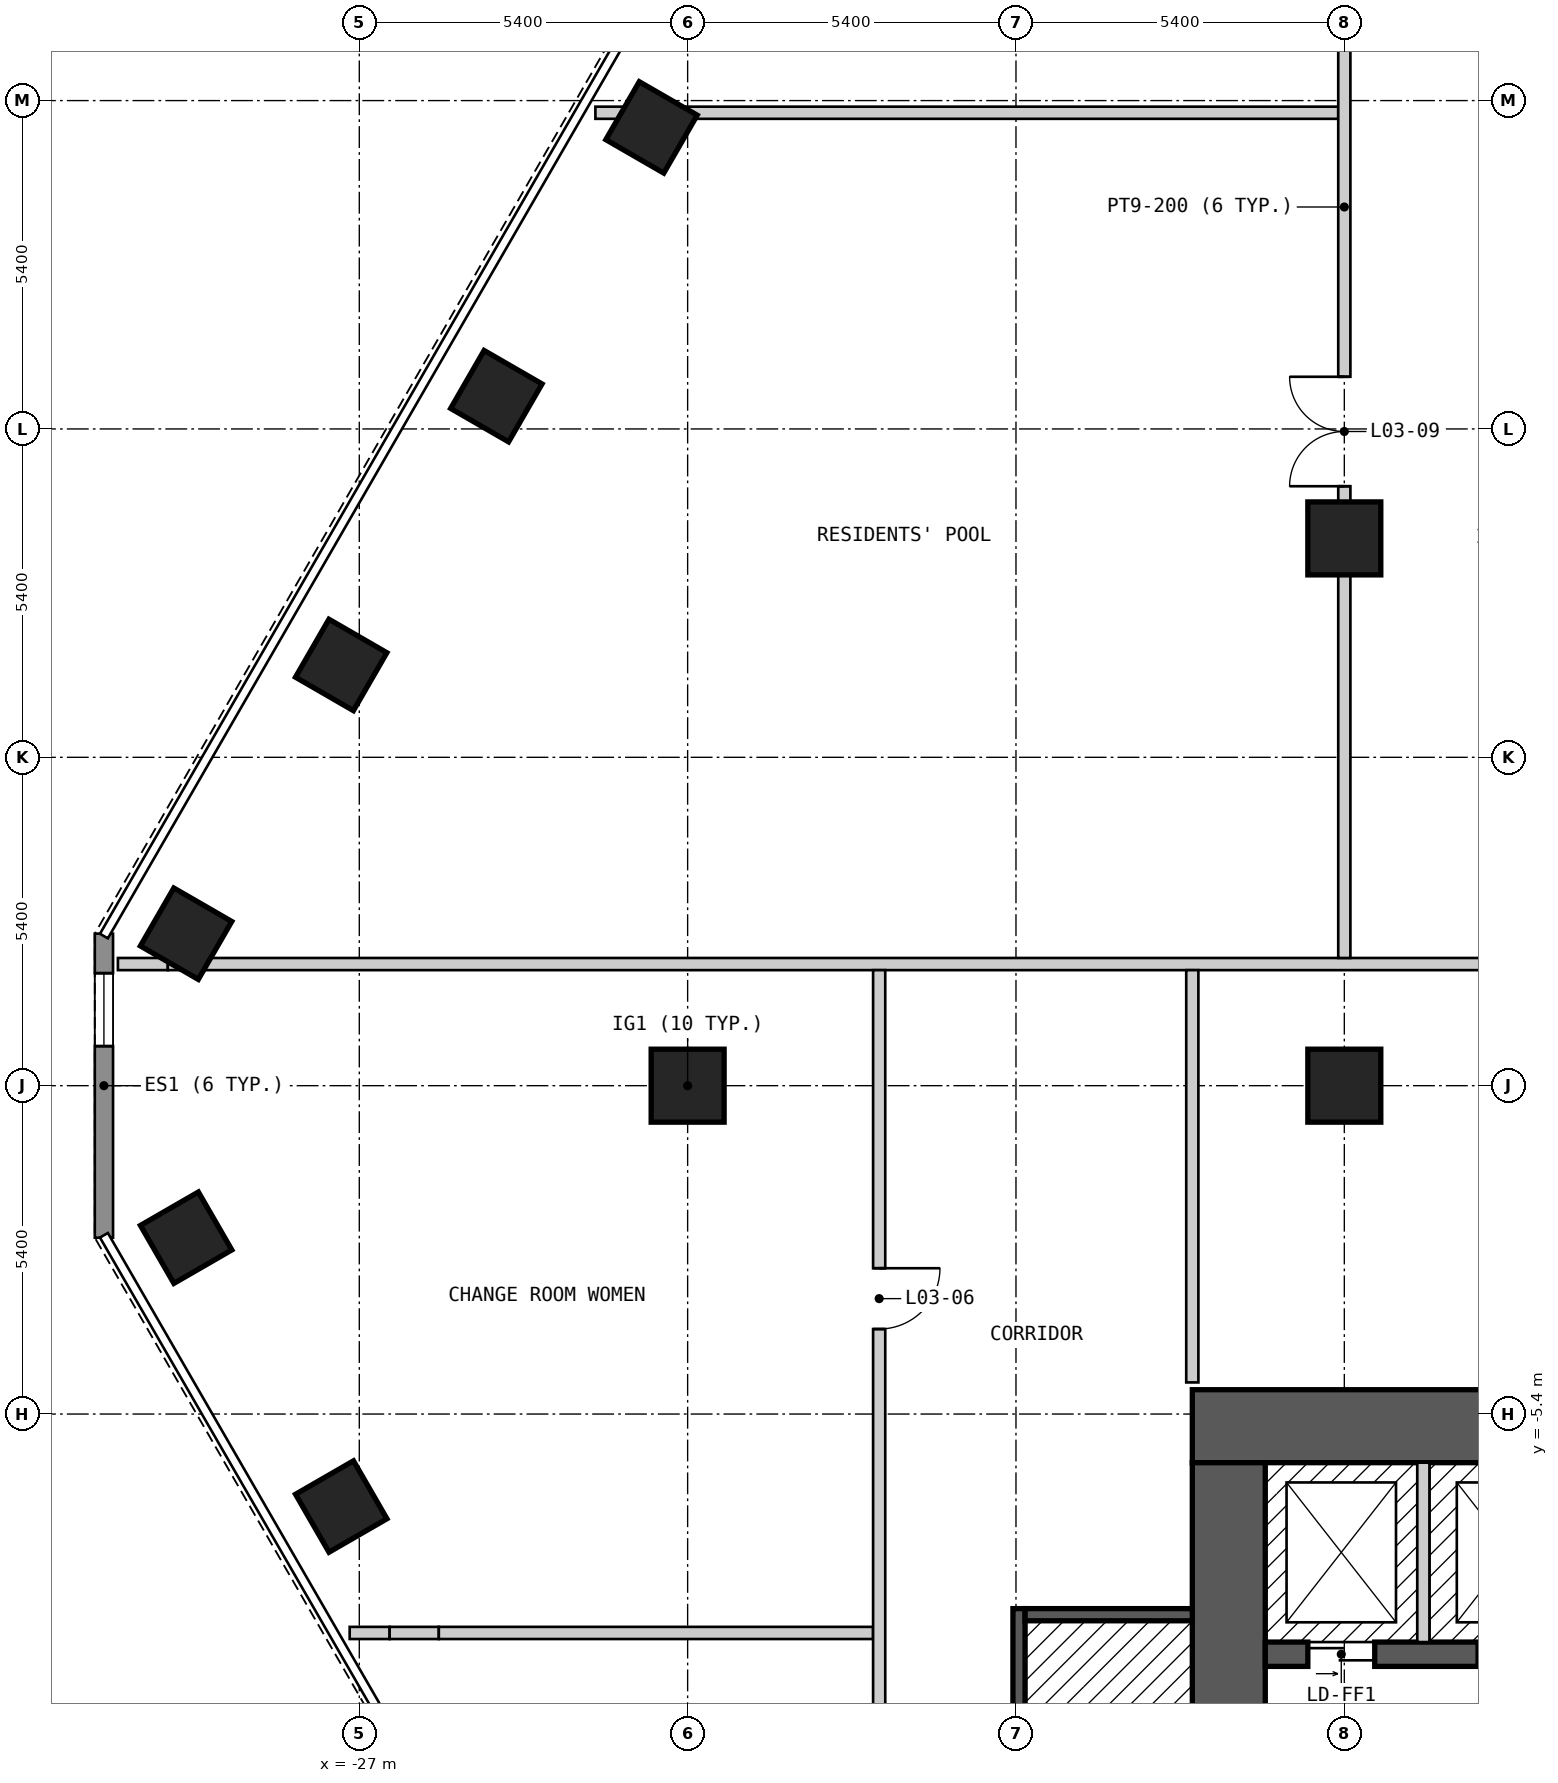
"""IFC4 building model, lengths in metres.
Left out: names, types, materials, properties, quantities, classifications, styles, units other than length and angle.
Written with IfcOpenShell. Run it as: python <this file> out.ifc"""

import sys

from ifc_helpers import new_model, si_unit, direction, frame, frame_2d, origin, origin_2d, place, context, subcontext, project, spatial, polyline, rectangle, outline, extrude, element, fill, save


model = new_model("IFC4")
c1 = context("Model", 3, precision=1e-05, world=origin(), true_north=direction((0.0, 1.0)))
c2 = subcontext(c1, "Body", "Model", "MODEL_VIEW")
j1 = project(units=[si_unit("LENGTHUNIT", "METRE"), si_unit("PLANEANGLEUNIT", "RADIAN")], contexts=[c1])
p1 = place(None, origin())
s1 = spatial("IfcSite", under=j1, at=p1, CompositionType="ELEMENT")
p2 = place(p1, origin())
s2 = spatial("IfcBuilding", under=s1, at=p2, CompositionType="ELEMENT")
p3 = place(p2, frame((0.0, 0.0, 12.6)))
s3 = spatial("IfcBuildingStorey", under=s2, at=p3, CompositionType="ELEMENT", Elevation=12.6)
for number, where, z_axis, x_axis in (
    (1, (-22.194, 15.759, 0.0), (0.0, 0.0, 1.0), (-0.5, -0.866, 0.0)),
    (2, (-24.746, 11.339, 0.0), (0.0, 0.0, 1.0), (-0.5, -0.866, 0.0)),
    (3, (-27.298, 6.919, 0.0), (0.0, 0.0, 1.0), (-0.5, -0.866, 0.0)),
    (4, (-29.849, 2.499, 0.0), (0.0, 0.0, 1.0), (-0.5, -0.866, 0.0)),
    (5, (-29.848, -2.5, 0.0), (0.0, 0.0, 1.0), (0.5, -0.866, 0.0)),
    (6, (-27.297, -6.921, 0.0), (0.0, 0.0, 1.0), (0.5, -0.866, 0.0)),
):
    element("IfcColumn", number, at=place(p3, frame(where, z_axis=z_axis, x_axis=x_axis)), inside=s3, PredefinedType="COLUMN", context=c2, shape_type="SweptSolid", body=[
        extrude(rectangle(XDim=1.1, YDim=1.1, at=origin_2d()), origin(), (0.0, 0.0, 1.0), 3.6),
    ])
for number, where, z_axis, x_axis in (
    (7, (-21.6, 0.0, 0.0), (0.0, 0.0, 1.0), (1.0, 0.0, 0.0)),
    (8, (-10.8, 0.0, 0.0), (0.0, 0.0, 1.0), (1.0, 0.0, 0.0)),
    (9, (-10.8, 9.0, 0.0), (0.0, 0.0, 1.0), (1.0, 0.0, 0.0)),
):
    element("IfcColumn", number, at=place(p3, frame(where, z_axis=z_axis, x_axis=x_axis)), inside=s3, PredefinedType="COLUMN", context=c2, shape_type="SweptSolid", body=[
        extrude(rectangle(XDim=1.2, YDim=1.2, at=origin_2d()), origin(), (0.0, 0.0, 1.0), 3.6),
    ])
p4 = place(p3, frame((-13.3, -5.6, 0.0), z_axis=(0.0, 0.0, 1.0), x_axis=(1.0, 0.0, 0.0)))
e10 = element("IfcWall", 10, at=p4, inside=s3, PredefinedType="SHEAR", context=c2, shape_type="SweptSolid", body=[
    extrude(rectangle(XDim=26.6, YDim=1.2, at=frame_2d((13.3, 0.0))), origin(), (0.0, 0.0, 1.0), 3.25),
])
p5 = place(p4, frame((23.65, 0.0, 0.0)))
e11 = element("IfcOpeningElement", 11, at=p5, cuts=e10, PredefinedType="OPENING", context=c2, shape_type="SweptSolid", body=[
    extrude(rectangle(XDim=1.2, YDim=2.1, at=frame_2d((0.6, 1.05))), frame((0.0, 0.61, 0.0), z_axis=(0.0, -1.0, 0.0), x_axis=(1.0, 0.0, 0.0)), (0.0, 0.0, 1.0), 1.22),
])
p6 = place(p3, frame((-12.7, -17.8, 0.0), z_axis=(0.0, 0.0, 1.0), x_axis=(0.0, 1.0, 0.0)))
e12 = element("IfcWall", 12, at=p6, inside=s3, PredefinedType="SHEAR", context=c2, shape_type="SweptSolid", body=[
    extrude(rectangle(XDim=11.6, YDim=1.2, at=frame_2d((5.8, 0.0))), origin(), (0.0, 0.0, 1.0), 3.25),
])
p7 = place(p6, frame((3.6, 0.0, 0.0)))
e13 = element("IfcOpeningElement", 13, at=p7, cuts=e12, PredefinedType="OPENING", context=c2, shape_type="SweptSolid", body=[
    extrude(rectangle(XDim=1.2, YDim=2.1, at=frame_2d((0.6, 1.05))), frame((0.0, 0.61, 0.0), z_axis=(0.0, -1.0, 0.0), x_axis=(1.0, 0.0, 0.0)), (0.0, 0.0, 1.0), 1.22),
])
p8 = place(p3, frame((-12.1, -9.35, 0.0), z_axis=(0.0, 0.0, 1.0), x_axis=(1.0, 0.0, 0.0)))
e14 = element("IfcWall", 14, at=p8, inside=s3, PredefinedType="SHEAR", context=c2, shape_type="SweptSolid", body=[
    extrude(rectangle(XDim=22.3, YDim=0.4, at=frame_2d((11.15, 0.0))), origin(), (0.0, 0.0, 1.0), 3.25),
])
p9 = place(p8, frame((0.7, 0.0, 0.0)))
e15 = element("IfcOpeningElement", 15, at=p9, cuts=e14, PredefinedType="OPENING", context=c2, shape_type="SweptSolid", body=[
    extrude(rectangle(XDim=1.1, YDim=2.1, at=frame_2d((0.55, 1.05))), frame((0.0, 0.21, 0.0), z_axis=(0.0, -1.0, 0.0), x_axis=(1.0, 0.0, 0.0)), (0.0, 0.0, 1.0), 0.42),
])
p10 = place(p8, frame((3.5, 0.0, 0.0)))
e16 = element("IfcOpeningElement", 16, at=p10, cuts=e14, PredefinedType="OPENING", context=c2, shape_type="SweptSolid", body=[
    extrude(rectangle(XDim=1.1, YDim=2.1, at=frame_2d((0.55, 1.05))), frame((0.0, 0.21, 0.0), z_axis=(0.0, -1.0, 0.0), x_axis=(1.0, 0.0, 0.0)), (0.0, 0.0, 1.0), 0.42),
])
p11 = place(p8, frame((6.3, 0.0, 0.0)))
e17 = element("IfcOpeningElement", 17, at=p11, cuts=e14, PredefinedType="OPENING", context=c2, shape_type="SweptSolid", body=[
    extrude(rectangle(XDim=1.1, YDim=2.1, at=frame_2d((0.55, 1.05))), frame((0.0, 0.21, 0.0), z_axis=(0.0, -1.0, 0.0), x_axis=(1.0, 0.0, 0.0)), (0.0, 0.0, 1.0), 0.42),
])
p12 = place(p8, frame((8.6, 0.0, 0.0)))
e18 = element("IfcOpeningElement", 18, at=p12, cuts=e14, PredefinedType="OPENING", context=c2, shape_type="SweptSolid", body=[
    extrude(rectangle(XDim=1.1, YDim=2.1, at=frame_2d((0.55, 1.05))), frame((0.0, 0.21, 0.0), z_axis=(0.0, -1.0, 0.0), x_axis=(1.0, 0.0, 0.0)), (0.0, 0.0, 1.0), 0.42),
])
p13 = place(p8, frame((10.9, 0.0, 0.0)))
e19 = element("IfcOpeningElement", 19, at=p13, cuts=e14, PredefinedType="OPENING", context=c2, shape_type="SweptSolid", body=[
    extrude(rectangle(XDim=1.1, YDim=2.1, at=frame_2d((0.55, 1.05))), frame((0.0, 0.21, 0.0), z_axis=(0.0, -1.0, 0.0), x_axis=(1.0, 0.0, 0.0)), (0.0, 0.0, 1.0), 0.42),
])
p14 = place(p8, frame((13.2, 0.0, 0.0)))
e20 = element("IfcOpeningElement", 20, at=p14, cuts=e14, PredefinedType="OPENING", context=c2, shape_type="SweptSolid", body=[
    extrude(rectangle(XDim=1.1, YDim=2.1, at=frame_2d((0.55, 1.05))), frame((0.0, 0.21, 0.0), z_axis=(0.0, -1.0, 0.0), x_axis=(1.0, 0.0, 0.0)), (0.0, 0.0, 1.0), 0.42),
])
p15 = place(p8, frame((15.5, 0.0, 0.0)))
e21 = element("IfcOpeningElement", 21, at=p15, cuts=e14, PredefinedType="OPENING", context=c2, shape_type="SweptSolid", body=[
    extrude(rectangle(XDim=1.1, YDim=2.1, at=frame_2d((0.55, 1.05))), frame((0.0, 0.21, 0.0), z_axis=(0.0, -1.0, 0.0), x_axis=(1.0, 0.0, 0.0)), (0.0, 0.0, 1.0), 0.42),
])
p16 = place(p8, frame((17.8, 0.0, 0.0)))
e22 = element("IfcOpeningElement", 22, at=p16, cuts=e14, PredefinedType="OPENING", context=c2, shape_type="SweptSolid", body=[
    extrude(rectangle(XDim=1.1, YDim=2.1, at=frame_2d((0.55, 1.05))), frame((0.0, 0.21, 0.0), z_axis=(0.0, -1.0, 0.0), x_axis=(1.0, 0.0, 0.0)), (0.0, 0.0, 1.0), 0.42),
])
p17 = place(p8, frame((20.2, 0.0, 0.0)))
e23 = element("IfcOpeningElement", 23, at=p17, cuts=e14, PredefinedType="OPENING", context=c2, shape_type="SweptSolid", body=[
    extrude(rectangle(XDim=1.1, YDim=2.1, at=frame_2d((0.55, 1.05))), frame((0.0, 0.21, 0.0), z_axis=(0.0, -1.0, 0.0), x_axis=(1.0, 0.0, 0.0)), (0.0, 0.0, 1.0), 0.42),
])
p18 = place(p3, frame((-31.2, 2.5, 0.0), z_axis=(0.0, 0.0, 1.0), x_axis=(0.0, -1.0, 0.0)))
e24 = element("IfcWall", 24, at=p18, inside=s3, PredefinedType="SOLIDWALL", context=c2, shape_type="SweptSolid", body=[
    extrude(outline(polyline([(0.0, -0.15), (5.0, -0.15), (4.92, 0.15), (0.08, 0.15), (0.0, -0.15)])), origin(), (0.0, 0.0, 1.0), 3.25),
])
p19 = place(p18, frame((0.65, 0.0, 0.15)))
e25 = element("IfcOpeningElement", 25, at=p19, cuts=e24, PredefinedType="OPENING", context=c2, shape_type="SweptSolid", body=[
    extrude(rectangle(XDim=1.2, YDim=2.1, at=frame_2d((0.6, 1.05))), frame((0.0, 0.16, 0.0), z_axis=(0.0, -1.0, 0.0), x_axis=(1.0, 0.0, 0.0)), (0.0, 0.0, 1.0), 0.32),
])
p20 = place(p3, frame((-27.158, -9.0, 0.0), z_axis=(0.0, 0.0, 1.0), x_axis=(1.0, 0.0, 0.0)))
e26 = element("IfcWall", 26, at=p20, inside=s3, PredefinedType="PARTITIONING", context=c2, shape_type="SweptSolid", body=[
    extrude(rectangle(XDim=0.657, YDim=0.2, at=frame_2d((0.329, 0.0))), origin(), (0.0, 0.0, 1.0), 3.25),
])
p21 = place(p3, frame((-26.501, -9.0, 0.0), z_axis=(0.0, 0.0, 1.0), x_axis=(1.0, 0.0, 0.0)))
e27 = element("IfcWall", 27, at=p21, inside=s3, PredefinedType="PARTITIONING", context=c2, shape_type="SweptSolid", body=[
    extrude(rectangle(XDim=0.809, YDim=0.2, at=frame_2d((0.405, 0.0))), origin(), (0.0, 0.0, 1.0), 2.52),
])
p22 = place(p3, frame((-25.692, -9.0, 0.0), z_axis=(0.0, 0.0, 1.0), x_axis=(1.0, 0.0, 0.0)))
e28 = element("IfcWall", 28, at=p22, inside=s3, PredefinedType="PARTITIONING", context=c2, shape_type="SweptSolid", body=[
    extrude(rectangle(XDim=7.142, YDim=0.2, at=frame_2d((3.571, 0.0))), origin(), (0.0, 0.0, 1.0), 3.25),
])
p23 = place(p3, frame((-30.97, 2.0, 0.0), z_axis=(0.0, 0.0, 1.0), x_axis=(1.0, 0.0, 0.0)))
e29 = element("IfcWall", 29, at=p23, inside=s3, PredefinedType="PARTITIONING", context=c2, shape_type="SweptSolid", body=[
    extrude(rectangle(XDim=0.821, YDim=0.2, at=frame_2d((0.411, 0.0))), origin(), (0.0, 0.0, 1.0), 3.25),
])
p24 = place(p3, frame((-30.149, 2.0, 0.0), z_axis=(0.0, 0.0, 1.0), x_axis=(1.0, 0.0, 0.0)))
e30 = element("IfcWall", 30, at=p24, inside=s3, PredefinedType="PARTITIONING", context=c2, shape_type="SweptSolid", body=[
    extrude(rectangle(XDim=0.6, YDim=0.2, at=frame_2d((0.3, 0.0))), origin(), (0.0, 0.0, 1.0), 2.52),
])
p25 = place(p3, frame((-29.549, 2.0, 0.0), z_axis=(0.0, 0.0, 1.0), x_axis=(1.0, 0.0, 0.0)))
e31 = element("IfcWall", 31, at=p25, inside=s3, PredefinedType="PARTITIONING", context=c2, shape_type="SweptSolid", body=[
    extrude(rectangle(XDim=59.097, YDim=0.2, at=frame_2d((29.549, 0.0))), origin(), (0.0, 0.0, 1.0), 3.25),
])
p26 = place(p25, frame((21.517, 0.0, 0.0)))
e32 = element("IfcOpeningElement", 32, at=p26, cuts=e31, PredefinedType="OPENING", context=c2, shape_type="SweptSolid", body=[
    extrude(rectangle(XDim=1.8, YDim=2.1, at=frame_2d((0.9, 1.05))), frame((0.0, 0.11, 0.0), z_axis=(0.0, -1.0, 0.0), x_axis=(1.0, 0.0, 0.0)), (0.0, 0.0, 1.0), 0.22),
])
p27 = place(p25, frame((35.781, 0.0, 0.0)))
e33 = element("IfcOpeningElement", 33, at=p27, cuts=e31, PredefinedType="OPENING", context=c2, shape_type="SweptSolid", body=[
    extrude(rectangle(XDim=1.8, YDim=2.1, at=frame_2d((0.9, 1.05))), frame((0.0, 0.11, 0.0), z_axis=(0.0, -1.0, 0.0), x_axis=(1.0, 0.0, 0.0)), (0.0, 0.0, 1.0), 0.22),
])
p28 = place(p3, frame((-23.117, 16.0, 0.0), z_axis=(0.0, 0.0, 1.0), x_axis=(1.0, 0.0, 0.0)))
e34 = element("IfcWall", 34, at=p28, inside=s3, PredefinedType="SOLIDWALL", context=c2, shape_type="SweptSolid", body=[
    extrude(rectangle(XDim=0.663, YDim=0.2, at=frame_2d((0.332, 0.0))), origin(), (0.0, 0.0, 1.0), 3.25),
])
p29 = place(p3, frame((-22.454, 16.0, 0.0), z_axis=(0.0, 0.0, 1.0), x_axis=(1.0, 0.0, 0.0)))
e35 = element("IfcWall", 35, at=p29, inside=s3, PredefinedType="SOLIDWALL", context=c2, shape_type="SweptSolid", body=[
    extrude(rectangle(XDim=0.803, YDim=0.2, at=frame_2d((0.402, 0.0))), origin(), (0.0, 0.0, 1.0), 2.52),
])
p30 = place(p3, frame((-21.651, 16.0, 0.0), z_axis=(0.0, 0.0, 1.0), x_axis=(1.0, 0.0, 0.0)))
e36 = element("IfcWall", 36, at=p30, inside=s3, PredefinedType="SOLIDWALL", context=c2, shape_type="SweptSolid", body=[
    extrude(rectangle(XDim=10.751, YDim=0.2, at=frame_2d((5.375, 0.0))), origin(), (0.0, 0.0, 1.0), 3.25),
])
p31 = place(p3, frame((-18.45, -21.471, 0.0), z_axis=(0.0, 0.0, 1.0), x_axis=(0.0, 1.0, 0.0)))
e37 = element("IfcWall", 37, at=p31, inside=s3, PredefinedType="PARTITIONING", context=c2, shape_type="SweptSolid", body=[
    extrude(rectangle(XDim=23.371, YDim=0.2, at=frame_2d((11.686, 0.0))), origin(), (0.0, 0.0, 1.0), 3.25),
])
p32 = place(p31, frame((5.873, 0.0, 0.0)))
e38 = element("IfcOpeningElement", 38, at=p32, cuts=e37, PredefinedType="OPENING", context=c2, shape_type="SweptSolid", body=[
    extrude(rectangle(XDim=1.0, YDim=2.1, at=frame_2d((0.5, 1.05))), frame((0.0, 0.11, 0.0), z_axis=(0.0, -1.0, 0.0), x_axis=(1.0, 0.0, 0.0)), (0.0, 0.0, 1.0), 0.22),
])
p33 = place(p31, frame((17.469, 0.0, 0.0)))
e39 = element("IfcOpeningElement", 39, at=p33, cuts=e37, PredefinedType="OPENING", context=c2, shape_type="SweptSolid", body=[
    extrude(rectangle(XDim=1.0, YDim=2.1, at=frame_2d((0.5, 1.05))), frame((0.0, 0.11, 0.0), z_axis=(0.0, -1.0, 0.0), x_axis=(1.0, 0.0, 0.0)), (0.0, 0.0, 1.0), 0.22),
])
p34 = place(p3, frame((-13.3, -4.88, 0.0), z_axis=(0.0, 0.0, 1.0), x_axis=(0.0, 1.0, 0.0)))
e40 = element("IfcWall", 40, at=p34, inside=s3, PredefinedType="PARTITIONING", context=c2, shape_type="SweptSolid", body=[
    extrude(rectangle(XDim=6.78, YDim=0.2, at=frame_2d((3.39, 0.0))), origin(), (0.0, 0.0, 1.0), 3.25),
])
p35 = place(p3, frame((-10.8, 2.1, 0.0), z_axis=(0.0, 0.0, 1.0), x_axis=(0.0, 1.0, 0.0)))
e41 = element("IfcWall", 41, at=p35, inside=s3, PredefinedType="SOLIDWALL", context=c2, shape_type="SweptSolid", body=[
    extrude(rectangle(XDim=24.7, YDim=0.2, at=frame_2d((12.35, 0.0))), origin(), (0.0, 0.0, 1.0), 3.25),
])
p36 = place(p35, frame((7.758, 0.0, 0.0)))
e42 = element("IfcOpeningElement", 42, at=p36, cuts=e41, PredefinedType="OPENING", context=c2, shape_type="SweptSolid", body=[
    extrude(rectangle(XDim=1.8, YDim=2.1, at=frame_2d((0.9, 1.05))), frame((0.0, 0.11, 0.0), z_axis=(0.0, -1.0, 0.0), x_axis=(1.0, 0.0, 0.0)), (0.0, 0.0, 1.0), 0.22),
])
p37 = place(p35, frame((20.45, 0.0, 0.0)))
e43 = element("IfcOpeningElement", 43, at=p37, cuts=e41, PredefinedType="OPENING", context=c2, shape_type="SweptSolid", body=[
    extrude(rectangle(XDim=1.0, YDim=2.1, at=frame_2d((0.5, 1.05))), frame((0.0, 0.11, 0.0), z_axis=(0.0, -1.0, 0.0), x_axis=(1.0, 0.0, 0.0)), (0.0, 0.0, 1.0), 0.22),
])
p38 = place(p3, frame((-16.15, -14.4, 0.0), z_axis=(0.0, 0.0, 1.0), x_axis=(0.0, 1.0, 0.0)))
e44 = element("IfcWall", 44, at=p38, inside=s3, PredefinedType="SOLIDWALL", context=c2, shape_type="SweptSolid", body=[
    extrude(rectangle(XDim=5.8, YDim=0.2, at=frame_2d((2.9, 0.0))), origin(), (0.0, 0.0, 1.0), 3.25),
])
p39 = place(p3, frame((-16.05, -8.7, 0.0), z_axis=(0.0, 0.0, 1.0), x_axis=(1.0, 0.0, 0.0)))
e45 = element("IfcWall", 45, at=p39, inside=s3, PredefinedType="SOLIDWALL", context=c2, shape_type="SweptSolid", body=[
    extrude(rectangle(XDim=2.75, YDim=0.2, at=frame_2d((1.375, 0.0))), origin(), (0.0, 0.0, 1.0), 3.25),
])
p40 = place(p3, frame((-9.5, -9.15, 0.0), z_axis=(0.0, 0.0, 1.0), x_axis=(0.0, 1.0, 0.0)))
e46 = element("IfcWall", 46, at=p40, inside=s3, PredefinedType="SOLIDWALL", context=c2, shape_type="SweptSolid", body=[
    extrude(rectangle(XDim=2.95, YDim=0.2, at=frame_2d((1.475, 0.0))), origin(), (0.0, 0.0, 1.0), 3.25),
])
p41 = place(p19, origin())
e47 = element("IfcWindow", 47, at=p41, inside=s3, PartitioningType="SINGLE_PANEL", PredefinedType="WINDOW", context=c2, shape_type="SweptSolid", body=[
    extrude(rectangle(XDim=1.2, YDim=2.1, at=frame_2d((0.6, 1.05))), frame((0.0, 0.03, 0.0), z_axis=(0.0, -1.0, 0.0), x_axis=(1.0, 0.0, 0.0)), (0.0, 0.0, 1.0), 0.06),
])
fill(e25, e47)
p42 = place(p33, origin())
e48 = element("IfcDoor", 48, at=p42, inside=s3, OperationType="SINGLE_SWING_RIGHT", PredefinedType="DOOR", context=c2, shape_type="SweptSolid", body=[
    extrude(rectangle(XDim=1.0, YDim=2.1, at=frame_2d((0.5, 1.05))), frame((0.0, 0.025, 0.0), z_axis=(0.0, -1.0, 0.0), x_axis=(1.0, 0.0, 0.0)), (0.0, 0.0, 1.0), 0.05),
])
fill(e39, e48)
p43 = place(p36, origin())
e49 = element("IfcDoor", 49, at=p43, inside=s3, OperationType="DOUBLE_DOOR_SINGLE_SWING", PredefinedType="DOOR", context=c2, shape_type="SweptSolid", body=[
    extrude(rectangle(XDim=1.8, YDim=2.1, at=frame_2d((0.9, 1.05))), frame((0.0, 0.025, 0.0), z_axis=(0.0, -1.0, 0.0), x_axis=(1.0, 0.0, 0.0)), (0.0, 0.0, 1.0), 0.05),
])
fill(e42, e49)
p44 = place(p9, origin())
e50 = element("IfcDoor", 50, at=p44, inside=s3, OperationType="DOUBLE_DOOR_SLIDING", PredefinedType="DOOR", context=c2, shape_type="SweptSolid", body=[
    extrude(rectangle(XDim=1.1, YDim=2.1, at=frame_2d((0.55, 1.05))), frame((0.0, 0.025, 0.0), z_axis=(0.0, -1.0, 0.0), x_axis=(1.0, 0.0, 0.0)), (0.0, 0.0, 1.0), 0.05),
])
fill(e15, e50)
save(model, sys.argv[1])
